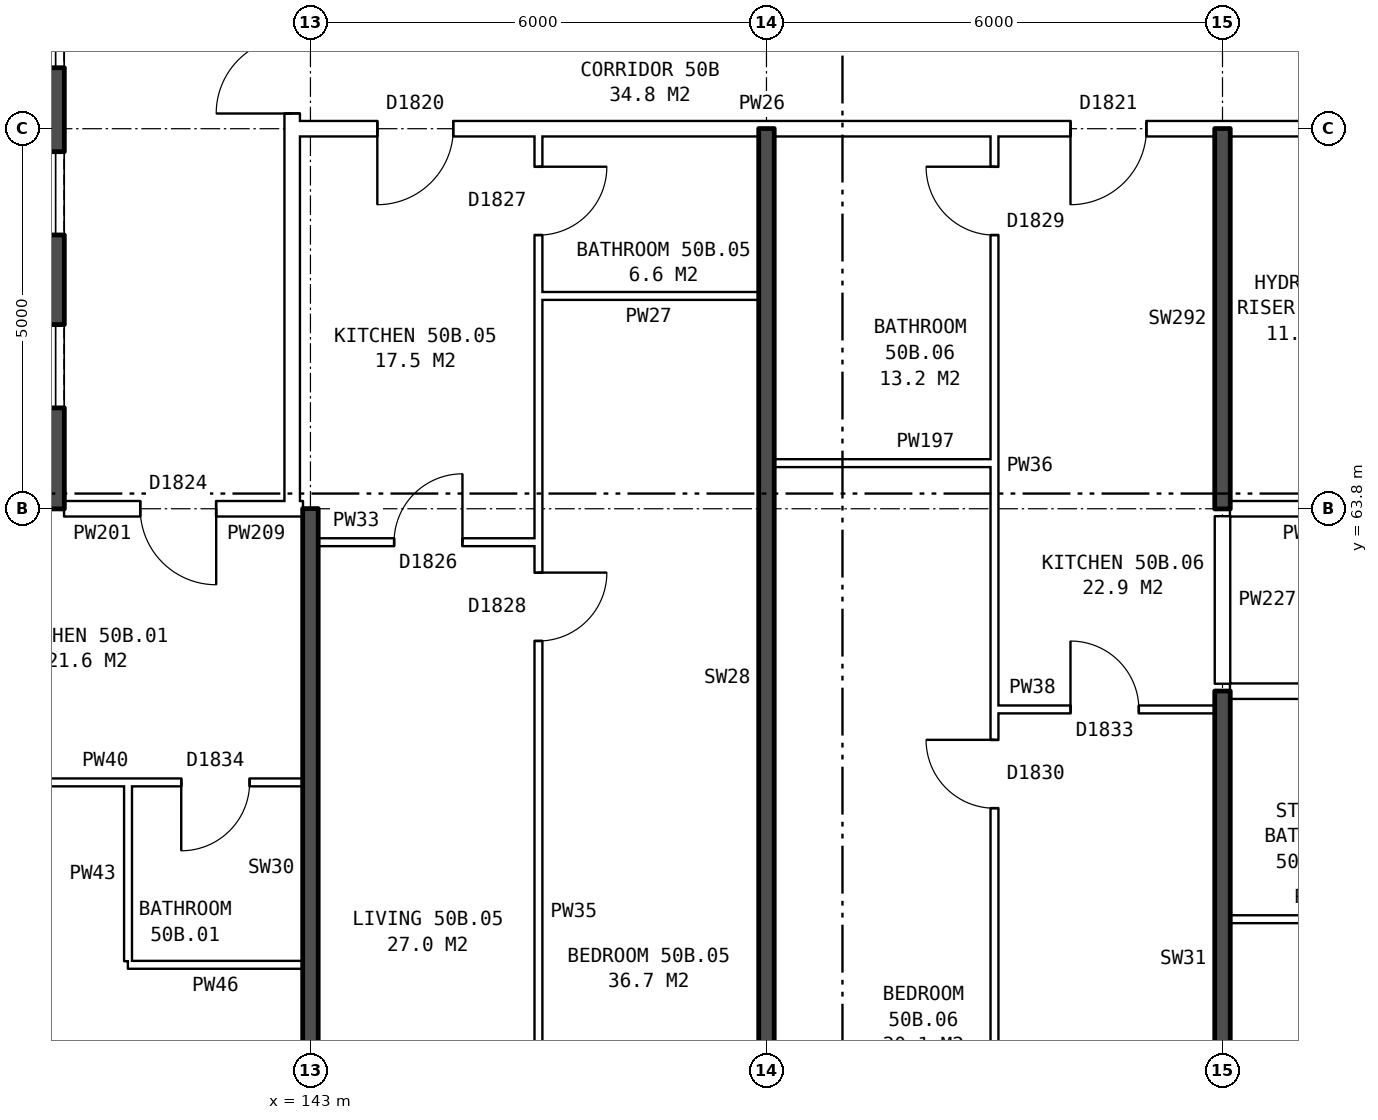
"""IFC4 building model, lengths in metres.
Left out: names, types, materials, properties, quantities, classifications, styles, units other than length and angle.
Written with IfcOpenShell. Run it as: python <this file> out.ifc"""

import sys

from ifc_helpers import new_model, si_unit, direction, frame, frame_2d, origin, place, context, subcontext, project, spatial, rectangle, extrude, element, fill, save


model = new_model("IFC4")
c1 = context("Model", 3, precision=1e-05, world=origin(), true_north=direction((0.0, 1.0)))
c2 = subcontext(c1, "Body", "Model", "MODEL_VIEW")
j1 = project(units=[si_unit("LENGTHUNIT", "METRE"), si_unit("PLANEANGLEUNIT", "RADIAN")], contexts=[c1])
p1 = place(None, origin())
s1 = spatial("IfcSite", under=j1, at=p1, CompositionType="ELEMENT")
p2 = place(p1, origin())
s2 = spatial("IfcBuilding", under=s1, at=p2, CompositionType="ELEMENT")
p3 = place(p2, frame((0.0, 0.0, 178.9)))
s3 = spatial("IfcBuildingStorey", under=s2, at=p3, CompositionType="ELEMENT", Elevation=178.9)
p4 = place(p3, frame((139.535, 63.8, 0.0), z_axis=(0.0, 0.0, 1.0), x_axis=(0.0, 1.0, 0.0)))
e1 = element("IfcWall", 1, at=p4, inside=s3, PredefinedType="SHEAR", context=c2, shape_type="SweptSolid", body=[
    extrude(rectangle(XDim=12.4, YDim=0.45, at=frame_2d((6.2, 0.0))), origin(), (0.0, 0.0, 1.0), 2.85),
])
p5 = place(p4, frame((1.325, 0.0, 0.0)))
e2 = element("IfcOpeningElement", 2, at=p5, cuts=e1, PredefinedType="OPENING", context=c2, shape_type="SweptSolid", body=[
    extrude(rectangle(XDim=1.1, YDim=2.1, at=frame_2d((0.55, 1.05))), frame((0.0, 0.235, 0.0), z_axis=(0.0, -1.0, 0.0), x_axis=(1.0, 0.0, 0.0)), (0.0, 0.0, 1.0), 0.47),
])
p6 = place(p4, frame((3.6, 0.0, 0.0)))
e3 = element("IfcOpeningElement", 3, at=p6, cuts=e1, PredefinedType="OPENING", context=c2, shape_type="SweptSolid", body=[
    extrude(rectangle(XDim=1.1, YDim=2.1, at=frame_2d((0.55, 1.05))), frame((0.0, 0.235, 0.0), z_axis=(0.0, -1.0, 0.0), x_axis=(1.0, 0.0, 0.0)), (0.0, 0.0, 1.0), 0.47),
])
p7 = place(p4, frame((5.8, 0.0, 0.0)))
e4 = element("IfcOpeningElement", 4, at=p7, cuts=e1, PredefinedType="OPENING", context=c2, shape_type="SweptSolid", body=[
    extrude(rectangle(XDim=1.1, YDim=2.1, at=frame_2d((0.55, 1.05))), frame((0.0, 0.235, 0.0), z_axis=(0.0, -1.0, 0.0), x_axis=(1.0, 0.0, 0.0)), (0.0, 0.0, 1.0), 0.47),
])
p8 = place(p4, frame((9.9, 0.0, 0.0)))
e5 = element("IfcOpeningElement", 5, at=p8, cuts=e1, PredefinedType="OPENING", context=c2, shape_type="SweptSolid", body=[
    extrude(rectangle(XDim=1.1, YDim=2.1, at=frame_2d((0.55, 1.05))), frame((0.0, 0.235, 0.0), z_axis=(0.0, -1.0, 0.0), x_axis=(1.0, 0.0, 0.0)), (0.0, 0.0, 1.0), 0.47),
])
p9 = place(p4, frame((8.125, 0.0, 0.0)))
e6 = element("IfcOpeningElement", 6, at=p9, cuts=e1, PredefinedType="OPENING", context=c2, shape_type="SweptSolid", body=[
    extrude(rectangle(XDim=0.85, YDim=2.1, at=frame_2d((0.425, 1.05))), frame((0.0, 0.235, 0.0), z_axis=(0.0, -1.0, 0.0), x_axis=(1.0, 0.0, 0.0)), (0.0, 0.0, 1.0), 0.47),
])
p10 = place(p3, frame((142.76, 63.9, 0.0), z_axis=(0.0, 0.0, 1.0), x_axis=(0.0, 1.0, 0.0)))
e7 = element("IfcWall", 7, at=p10, inside=s3, PredefinedType="PARTITIONING", context=c2, shape_type="SweptSolid", body=[
    extrude(rectangle(XDim=12.2, YDim=0.2, at=frame_2d((6.1, 0.0))), origin(), (0.0, 0.0, 1.0), 2.85),
])
p11 = place(p10, frame((5.1, 0.0, 0.0)))
e8 = element("IfcOpeningElement", 8, at=p11, cuts=e7, PredefinedType="OPENING", context=c2, shape_type="SweptSolid", body=[
    extrude(rectangle(XDim=2.0, YDim=2.1, at=frame_2d((1.0, 1.05))), frame((0.0, 0.11, 0.0), z_axis=(0.0, -1.0, 0.0), x_axis=(1.0, 0.0, 0.0)), (0.0, 0.0, 1.0), 0.22),
])
for number, where, z_axis, x_axis in (
    (9, (140.6, 57.8, 0.0), (0.0, 0.0, 1.0), (1.0, 0.0, 0.0)),
    (10, (155.1, 58.4, 0.0), (0.0, 0.0, 1.0), (1.0, 0.0, 0.0)),
):
    element("IfcWall", number, at=place(p3, frame(where, z_axis=z_axis, x_axis=x_axis)), inside=s3, PredefinedType="PARTITIONING", context=c2, shape_type="SweptSolid", body=[
        extrude(rectangle(XDim=2.3, YDim=0.1, at=frame_2d((1.15, 0.0))), origin(), (0.0, 0.0, 1.0), 2.85),
    ])
p12 = place(p3, frame((137.1, 60.2, 0.0), z_axis=(0.0, 0.0, 1.0), x_axis=(1.0, 0.0, 0.0)))
e11 = element("IfcWall", 11, at=p12, inside=s3, PredefinedType="PARTITIONING", context=c2, shape_type="SweptSolid", body=[
    extrude(rectangle(XDim=5.8, YDim=0.1, at=frame_2d((2.9, 0.0))), origin(), (0.0, 0.0, 1.0), 2.85),
])
p13 = place(p12, frame((1.3, 0.0, 0.0)))
e12 = element("IfcOpeningElement", 12, at=p13, cuts=e11, PredefinedType="OPENING", context=c2, shape_type="SweptSolid", body=[
    extrude(rectangle(XDim=0.9, YDim=2.1, at=frame_2d((0.45, 1.05))), frame((0.0, 0.06, 0.0), z_axis=(0.0, -1.0, 0.0), x_axis=(1.0, 0.0, 0.0)), (0.0, 0.0, 1.0), 0.12),
])
p14 = place(p12, frame((4.2, 0.0, 0.0)))
e13 = element("IfcOpeningElement", 13, at=p14, cuts=e11, PredefinedType="OPENING", context=c2, shape_type="SweptSolid", body=[
    extrude(rectangle(XDim=0.9, YDim=2.1, at=frame_2d((0.45, 1.05))), frame((0.0, 0.06, 0.0), z_axis=(0.0, -1.0, 0.0), x_axis=(1.0, 0.0, 0.0)), (0.0, 0.0, 1.0), 0.12),
])
p15 = place(p3, frame((152.0, 61.16, 0.0), z_axis=(0.0, 0.0, 1.0), x_axis=(1.0, 0.0, 0.0)))
e14 = element("IfcWall", 14, at=p15, inside=s3, PredefinedType="PARTITIONING", context=c2, shape_type="SweptSolid", body=[
    extrude(rectangle(XDim=2.9, YDim=0.1, at=frame_2d((1.45, 0.0))), origin(), (0.0, 0.0, 1.0), 2.85),
])
p16 = place(p15, frame((1.0, 0.0, 0.0)))
e15 = element("IfcOpeningElement", 15, at=p16, cuts=e14, PredefinedType="OPENING", context=c2, shape_type="SweptSolid", body=[
    extrude(rectangle(XDim=0.9, YDim=2.1, at=frame_2d((0.45, 1.05))), frame((0.0, 0.06, 0.0), z_axis=(0.0, -1.0, 0.0), x_axis=(1.0, 0.0, 0.0)), (0.0, 0.0, 1.0), 0.12),
])
p17 = place(p3, frame((155.1, 61.4, 0.0), z_axis=(0.0, 0.0, 1.0), x_axis=(1.0, 0.0, 0.0)))
e16 = element("IfcWall", 16, at=p17, inside=s3, PredefinedType="PARTITIONING", context=c2, shape_type="SweptSolid", body=[
    extrude(rectangle(XDim=14.79, YDim=0.2, at=frame_2d((7.395, 0.0))), origin(), (0.0, 0.0, 1.0), 2.85),
])
p18 = place(p17, frame((3.6, 0.0, 0.0)))
e17 = element("IfcOpeningElement", 17, at=p18, cuts=e16, PredefinedType="OPENING", context=c2, shape_type="SweptSolid", body=[
    extrude(rectangle(XDim=1.0, YDim=2.1, at=frame_2d((0.5, 1.05))), frame((0.0, 0.11, 0.0), z_axis=(0.0, -1.0, 0.0), x_axis=(1.0, 0.0, 0.0)), (0.0, 0.0, 1.0), 0.22),
])
p19 = place(p17, frame((11.045, 0.0, 0.0)))
e18 = element("IfcOpeningElement", 18, at=p19, cuts=e16, PredefinedType="OPENING", context=c2, shape_type="SweptSolid", body=[
    extrude(rectangle(XDim=1.0, YDim=2.1, at=frame_2d((0.5, 1.05))), frame((0.0, 0.11, 0.0), z_axis=(0.0, -1.0, 0.0), x_axis=(1.0, 0.0, 0.0)), (0.0, 0.0, 1.0), 0.22),
])
p20 = place(p3, frame((143.1, 63.36, 0.0), z_axis=(0.0, 0.0, 1.0), x_axis=(1.0, 0.0, 0.0)))
e19 = element("IfcWall", 19, at=p20, inside=s3, PredefinedType="PARTITIONING", context=c2, shape_type="SweptSolid", body=[
    extrude(rectangle(XDim=2.9, YDim=0.1, at=frame_2d((1.45, 0.0))), origin(), (0.0, 0.0, 1.0), 2.85),
])
p21 = place(p20, frame((1.0, 0.0, 0.0)))
e20 = element("IfcOpeningElement", 20, at=p21, cuts=e19, PredefinedType="OPENING", context=c2, shape_type="SweptSolid", body=[
    extrude(rectangle(XDim=0.9, YDim=2.1, at=frame_2d((0.45, 1.05))), frame((0.0, 0.06, 0.0), z_axis=(0.0, -1.0, 0.0), x_axis=(1.0, 0.0, 0.0)), (0.0, 0.0, 1.0), 0.12),
])
p22 = place(p3, frame((139.76, 63.8, 0.0), z_axis=(0.0, 0.0, 1.0), x_axis=(1.0, 0.0, 0.0)))
e21 = element("IfcWall", 21, at=p22, inside=s3, PredefinedType="PARTITIONING", context=c2, shape_type="SweptSolid", body=[
    extrude(rectangle(XDim=3.0, YDim=0.2, at=frame_2d((1.5, 0.0))), origin(), (0.0, 0.0, 1.0), 2.85),
])
p23 = place(p22, frame((1.0, 0.0, 0.0)))
e22 = element("IfcOpeningElement", 22, at=p23, cuts=e21, PredefinedType="OPENING", context=c2, shape_type="SweptSolid", body=[
    extrude(rectangle(XDim=1.0, YDim=2.1, at=frame_2d((0.5, 1.05))), frame((0.0, 0.11, 0.0), z_axis=(0.0, -1.0, 0.0), x_axis=(1.0, 0.0, 0.0)), (0.0, 0.0, 1.0), 0.22),
])
p24 = place(p3, frame((142.76, 63.8, 0.0), z_axis=(0.0, 0.0, 1.0), x_axis=(1.0, 0.0, 0.0)))
e23 = element("IfcWall", 23, at=p24, inside=s3, PredefinedType="PARTITIONING", context=c2, shape_type="SweptSolid", body=[
    extrude(rectangle(XDim=0.14, YDim=0.2, at=frame_2d((0.07, 0.0))), origin(), (0.0, 0.0, 1.0), 2.85),
])
p25 = place(p3, frame((155.1, 63.8, 0.0), z_axis=(0.0, 0.0, 1.0), x_axis=(1.0, 0.0, 0.0)))
e24 = element("IfcWall", 24, at=p25, inside=s3, PredefinedType="PARTITIONING", context=c2, shape_type="SweptSolid", body=[
    extrude(rectangle(XDim=2.14, YDim=0.2, at=frame_2d((1.07, 0.0))), origin(), (0.0, 0.0, 1.0), 2.85),
])
for number, where, z_axis, x_axis in (
    (25, (149.1, 64.4, 0.0), (0.0, 0.0, 1.0), (1.0, 0.0, 0.0)),
    (26, (146.0, 66.6, 0.0), (0.0, 0.0, 1.0), (1.0, 0.0, 0.0)),
):
    element("IfcWall", number, at=place(p3, frame(where, z_axis=z_axis, x_axis=x_axis)), inside=s3, PredefinedType="PARTITIONING", context=c2, shape_type="SweptSolid", body=[
        extrude(rectangle(XDim=2.9, YDim=0.1, at=frame_2d((1.45, 0.0))), origin(), (0.0, 0.0, 1.0), 2.85),
    ])
p26 = place(p3, frame((142.76, 68.8, 0.0), z_axis=(0.0, 0.0, 1.0), x_axis=(1.0, 0.0, 0.0)))
e27 = element("IfcWall", 27, at=p26, inside=s3, PredefinedType="PARTITIONING", context=c2, shape_type="SweptSolid", body=[
    extrude(rectangle(XDim=14.48, YDim=0.2, at=frame_2d((7.24, 0.0))), origin(), (0.0, 0.0, 1.0), 2.85),
])
p27 = place(p26, frame((1.12, 0.0, 0.0)))
e28 = element("IfcOpeningElement", 28, at=p27, cuts=e27, PredefinedType="OPENING", context=c2, shape_type="SweptSolid", body=[
    extrude(rectangle(XDim=1.0, YDim=2.1, at=frame_2d((0.5, 1.05))), frame((0.0, 0.11, 0.0), z_axis=(0.0, -1.0, 0.0), x_axis=(1.0, 0.0, 0.0)), (0.0, 0.0, 1.0), 0.22),
])
p28 = place(p26, frame((10.24, 0.0, 0.0)))
e29 = element("IfcOpeningElement", 29, at=p28, cuts=e27, PredefinedType="OPENING", context=c2, shape_type="SweptSolid", body=[
    extrude(rectangle(XDim=1.0, YDim=2.1, at=frame_2d((0.5, 1.05))), frame((0.0, 0.11, 0.0), z_axis=(0.0, -1.0, 0.0), x_axis=(1.0, 0.0, 0.0)), (0.0, 0.0, 1.0), 0.22),
])
p29 = place(p3, frame((140.6, 57.85, 0.0), z_axis=(0.0, 0.0, 1.0), x_axis=(0.0, 1.0, 0.0)))
e30 = element("IfcWall", 30, at=p29, inside=s3, PredefinedType="PARTITIONING", context=c2, shape_type="SweptSolid", body=[
    extrude(rectangle(XDim=2.3, YDim=0.1, at=frame_2d((1.15, 0.0))), origin(), (0.0, 0.0, 1.0), 2.85),
])
p30 = place(p3, frame((143.0, 54.36, 0.0), z_axis=(0.0, 0.0, 1.0), x_axis=(0.0, 1.0, 0.0)))
e31 = element("IfcWall", 31, at=p30, inside=s3, PredefinedType="SOLIDWALL", context=c2, shape_type="SweptSolid", body=[
    extrude(rectangle(XDim=9.44, YDim=0.2, at=frame_2d((4.72, 0.0))), origin(), (0.0, 0.0, 1.0), 2.85),
])
p31 = place(p3, frame((146.0, 54.36, 0.0), z_axis=(0.0, 0.0, 1.0), x_axis=(0.0, 1.0, 0.0)))
e32 = element("IfcWall", 32, at=p31, inside=s3, PredefinedType="PARTITIONING", context=c2, shape_type="SweptSolid", body=[
    extrude(rectangle(XDim=14.34, YDim=0.1, at=frame_2d((7.17, 0.0))), origin(), (0.0, 0.0, 1.0), 2.85),
])
p32 = place(p31, frame((7.7, 0.0, 0.0)))
e33 = element("IfcOpeningElement", 33, at=p32, cuts=e32, PredefinedType="OPENING", context=c2, shape_type="SweptSolid", body=[
    extrude(rectangle(XDim=0.9, YDim=2.1, at=frame_2d((0.45, 1.05))), frame((0.0, 0.06, 0.0), z_axis=(0.0, -1.0, 0.0), x_axis=(1.0, 0.0, 0.0)), (0.0, 0.0, 1.0), 0.12),
])
p33 = place(p31, frame((13.04, 0.0, 0.0)))
e34 = element("IfcOpeningElement", 34, at=p33, cuts=e32, PredefinedType="OPENING", context=c2, shape_type="SweptSolid", body=[
    extrude(rectangle(XDim=0.9, YDim=2.1, at=frame_2d((0.45, 1.05))), frame((0.0, 0.06, 0.0), z_axis=(0.0, -1.0, 0.0), x_axis=(1.0, 0.0, 0.0)), (0.0, 0.0, 1.0), 0.12),
])
p34 = place(p3, frame((149.0, 54.36, 0.0), z_axis=(0.0, 0.0, 1.0), x_axis=(0.0, 1.0, 0.0)))
e35 = element("IfcWall", 35, at=p34, inside=s3, PredefinedType="SOLIDWALL", context=c2, shape_type="SweptSolid", body=[
    extrude(rectangle(XDim=14.44, YDim=0.2, at=frame_2d((7.22, 0.0))), origin(), (0.0, 0.0, 1.0), 2.85),
])
p35 = place(p3, frame((152.0, 54.36, 0.0), z_axis=(0.0, 0.0, 1.0), x_axis=(0.0, 1.0, 0.0)))
e36 = element("IfcWall", 36, at=p35, inside=s3, PredefinedType="PARTITIONING", context=c2, shape_type="SweptSolid", body=[
    extrude(rectangle(XDim=14.34, YDim=0.1, at=frame_2d((7.17, 0.0))), origin(), (0.0, 0.0, 1.0), 2.85),
])
p36 = place(p35, frame((5.5, 0.0, 0.0)))
e37 = element("IfcOpeningElement", 37, at=p36, cuts=e36, PredefinedType="OPENING", context=c2, shape_type="SweptSolid", body=[
    extrude(rectangle(XDim=0.9, YDim=2.1, at=frame_2d((0.45, 1.05))), frame((0.0, 0.06, 0.0), z_axis=(0.0, -1.0, 0.0), x_axis=(1.0, 0.0, 0.0)), (0.0, 0.0, 1.0), 0.12),
])
p37 = place(p35, frame((13.04, 0.0, 0.0)))
e38 = element("IfcOpeningElement", 38, at=p37, cuts=e36, PredefinedType="OPENING", context=c2, shape_type="SweptSolid", body=[
    extrude(rectangle(XDim=0.9, YDim=2.1, at=frame_2d((0.45, 1.05))), frame((0.0, 0.06, 0.0), z_axis=(0.0, -1.0, 0.0), x_axis=(1.0, 0.0, 0.0)), (0.0, 0.0, 1.0), 0.12),
])
p38 = place(p3, frame((155.0, 54.36, 0.0), z_axis=(0.0, 0.0, 1.0), x_axis=(0.0, 1.0, 0.0)))
e39 = element("IfcWall", 39, at=p38, inside=s3, PredefinedType="SOLIDWALL", context=c2, shape_type="SweptSolid", body=[
    extrude(rectangle(XDim=7.04, YDim=0.2, at=frame_2d((3.52, 0.0))), origin(), (0.0, 0.0, 1.0), 2.85),
])
p39 = place(p3, frame((155.0, 61.5, 0.0), z_axis=(0.0, 0.0, 1.0), x_axis=(0.0, 1.0, 0.0)))
e40 = element("IfcWall", 40, at=p39, inside=s3, PredefinedType="PARTITIONING", context=c2, shape_type="SweptSolid", body=[
    extrude(rectangle(XDim=2.2, YDim=0.2, at=frame_2d((1.1, 0.0))), origin(), (0.0, 0.0, 1.0), 2.85),
])
p40 = place(p3, frame((155.0, 63.8, 0.0), z_axis=(0.0, 0.0, 1.0), x_axis=(0.0, 1.0, 0.0)))
e41 = element("IfcWall", 41, at=p40, inside=s3, PredefinedType="SOLIDWALL", context=c2, shape_type="SweptSolid", body=[
    extrude(rectangle(XDim=5.0, YDim=0.2, at=frame_2d((2.5, 0.0))), origin(), (0.0, 0.0, 1.0), 2.85),
])
p41 = place(p11, origin())
e42 = element("IfcDoor", 42, at=p41, inside=s3, OperationType="DOUBLE_DOOR_SINGLE_SWING", PredefinedType="DOOR", context=c2, shape_type="SweptSolid", body=[
    extrude(rectangle(XDim=2.0, YDim=2.1, at=frame_2d((1.0, 1.05))), frame((0.0, 0.025, 0.0), z_axis=(0.0, -1.0, 0.0), x_axis=(1.0, 0.0, 0.0)), (0.0, 0.0, 1.0), 0.05),
])
fill(e8, e42)
p42 = place(p23, frame((1.0, 0.0, 0.0), z_axis=(0.0, 0.0, 1.0), x_axis=(-1.0, 0.0, 0.0)))
e43 = element("IfcDoor", 43, at=p42, inside=s3, OperationType="SINGLE_SWING_LEFT", PredefinedType="DOOR", context=c2, shape_type="SweptSolid", body=[
    extrude(rectangle(XDim=1.0, YDim=2.1, at=frame_2d((0.5, 1.05))), frame((0.0, 0.025, 0.0), z_axis=(0.0, -1.0, 0.0), x_axis=(1.0, 0.0, 0.0)), (0.0, 0.0, 1.0), 0.05),
])
fill(e22, e43)
p43 = place(p14, frame((0.9, 0.0, 0.0), z_axis=(0.0, 0.0, 1.0), x_axis=(-1.0, 0.0, 0.0)))
e44 = element("IfcDoor", 44, at=p43, inside=s3, OperationType="SINGLE_SWING_RIGHT", PredefinedType="DOOR", context=c2, shape_type="SweptSolid", body=[
    extrude(rectangle(XDim=0.9, YDim=2.1, at=frame_2d((0.45, 1.05))), frame((0.0, 0.025, 0.0), z_axis=(0.0, -1.0, 0.0), x_axis=(1.0, 0.0, 0.0)), (0.0, 0.0, 1.0), 0.05),
])
fill(e13, e44)
p44 = place(p32, frame((0.9, 0.0, 0.0), z_axis=(0.0, 0.0, 1.0), x_axis=(-1.0, 0.0, 0.0)))
e45 = element("IfcDoor", 45, at=p44, inside=s3, OperationType="SINGLE_SWING_LEFT", PredefinedType="DOOR", context=c2, shape_type="SweptSolid", body=[
    extrude(rectangle(XDim=0.9, YDim=2.1, at=frame_2d((0.45, 1.05))), frame((0.0, 0.025, 0.0), z_axis=(0.0, -1.0, 0.0), x_axis=(1.0, 0.0, 0.0)), (0.0, 0.0, 1.0), 0.05),
])
fill(e33, e45)
p45 = place(p27, frame((1.0, 0.0, 0.0), z_axis=(0.0, 0.0, 1.0), x_axis=(-1.0, 0.0, 0.0)))
e46 = element("IfcDoor", 46, at=p45, inside=s3, OperationType="SINGLE_SWING_RIGHT", PredefinedType="DOOR", context=c2, shape_type="SweptSolid", body=[
    extrude(rectangle(XDim=1.0, YDim=2.1, at=frame_2d((0.5, 1.05))), frame((0.0, 0.025, 0.0), z_axis=(0.0, -1.0, 0.0), x_axis=(1.0, 0.0, 0.0)), (0.0, 0.0, 1.0), 0.05),
])
fill(e28, e46)
p46 = place(p21, origin())
e47 = element("IfcDoor", 47, at=p46, inside=s3, OperationType="SINGLE_SWING_RIGHT", PredefinedType="DOOR", context=c2, shape_type="SweptSolid", body=[
    extrude(rectangle(XDim=0.9, YDim=2.1, at=frame_2d((0.45, 1.05))), frame((0.0, 0.025, 0.0), z_axis=(0.0, -1.0, 0.0), x_axis=(1.0, 0.0, 0.0)), (0.0, 0.0, 1.0), 0.05),
])
fill(e20, e47)
p47 = place(p33, frame((0.9, 0.0, 0.0), z_axis=(0.0, 0.0, 1.0), x_axis=(-1.0, 0.0, 0.0)))
e48 = element("IfcDoor", 48, at=p47, inside=s3, OperationType="SINGLE_SWING_LEFT", PredefinedType="DOOR", context=c2, shape_type="SweptSolid", body=[
    extrude(rectangle(XDim=0.9, YDim=2.1, at=frame_2d((0.45, 1.05))), frame((0.0, 0.025, 0.0), z_axis=(0.0, -1.0, 0.0), x_axis=(1.0, 0.0, 0.0)), (0.0, 0.0, 1.0), 0.05),
])
fill(e34, e48)
p48 = place(p36, origin())
e49 = element("IfcDoor", 49, at=p48, inside=s3, OperationType="SINGLE_SWING_RIGHT", PredefinedType="DOOR", context=c2, shape_type="SweptSolid", body=[
    extrude(rectangle(XDim=0.9, YDim=2.1, at=frame_2d((0.45, 1.05))), frame((0.0, 0.025, 0.0), z_axis=(0.0, -1.0, 0.0), x_axis=(1.0, 0.0, 0.0)), (0.0, 0.0, 1.0), 0.05),
])
fill(e37, e49)
p49 = place(p28, frame((1.0, 0.0, 0.0), z_axis=(0.0, 0.0, 1.0), x_axis=(-1.0, 0.0, 0.0)))
e50 = element("IfcDoor", 50, at=p49, inside=s3, OperationType="SINGLE_SWING_RIGHT", PredefinedType="DOOR", context=c2, shape_type="SweptSolid", body=[
    extrude(rectangle(XDim=1.0, YDim=2.1, at=frame_2d((0.5, 1.05))), frame((0.0, 0.025, 0.0), z_axis=(0.0, -1.0, 0.0), x_axis=(1.0, 0.0, 0.0)), (0.0, 0.0, 1.0), 0.05),
])
fill(e29, e50)
p50 = place(p16, origin())
e51 = element("IfcDoor", 51, at=p50, inside=s3, OperationType="SINGLE_SWING_LEFT", PredefinedType="DOOR", context=c2, shape_type="SweptSolid", body=[
    extrude(rectangle(XDim=0.9, YDim=2.1, at=frame_2d((0.45, 1.05))), frame((0.0, 0.025, 0.0), z_axis=(0.0, -1.0, 0.0), x_axis=(1.0, 0.0, 0.0)), (0.0, 0.0, 1.0), 0.05),
])
fill(e15, e51)
p51 = place(p37, origin())
e52 = element("IfcDoor", 52, at=p51, inside=s3, OperationType="SINGLE_SWING_RIGHT", PredefinedType="DOOR", context=c2, shape_type="SweptSolid", body=[
    extrude(rectangle(XDim=0.9, YDim=2.1, at=frame_2d((0.45, 1.05))), frame((0.0, 0.025, 0.0), z_axis=(0.0, -1.0, 0.0), x_axis=(1.0, 0.0, 0.0)), (0.0, 0.0, 1.0), 0.05),
])
fill(e38, e52)
save(model, sys.argv[1])
